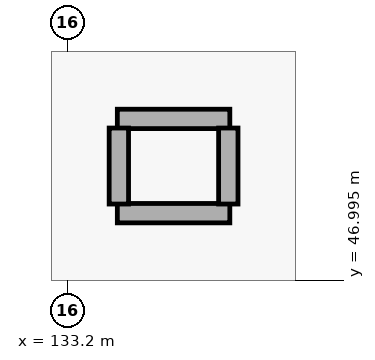
"""IFC4 building model, lengths in metres.
Left out: names, types, materials, properties, quantities, classifications, styles, units other than length and angle.
Written with IfcOpenShell. Run it as: python <this file> out.ifc"""

import sys

from ifc_helpers import new_model, si_unit, direction, frame, frame_2d, origin, place, context, subcontext, project, spatial, rectangle, extrude, element, save


model = new_model("IFC4")
c1 = context("Model", 3, precision=1e-05, world=origin(), true_north=direction((0.0, 1.0)))
c2 = subcontext(c1, "Body", "Model", "MODEL_VIEW")
j1 = project(units=[si_unit("LENGTHUNIT", "METRE"), si_unit("PLANEANGLEUNIT", "RADIAN")], contexts=[c1])
p1 = place(None, origin())
s1 = spatial("IfcSite", under=j1, at=p1, CompositionType="ELEMENT")
p2 = place(p1, origin())
s2 = spatial("IfcBuilding", under=s1, at=p2, CompositionType="ELEMENT")
p3 = place(p2, frame((0.0, 0.0, 15.6)))
s3 = spatial("IfcBuildingStorey", under=s2, at=p3, CompositionType="ELEMENT", Elevation=15.6)
for number, where, z_axis, x_axis in (
    (1, (133.86, 49.12, 0.0), (0.0, 0.0, 1.0), (1.0, 0.0, 0.0)),
    (2, (133.86, 47.88, 0.0), (0.0, 0.0, 1.0), (1.0, 0.0, 0.0)),
):
    element("IfcWall", number, at=place(p3, frame(where, z_axis=z_axis, x_axis=x_axis)), inside=s3, PredefinedType="PARTITIONING", context=c2, shape_type="SweptSolid", body=[
        extrude(rectangle(XDim=1.48, YDim=0.255, at=frame_2d((0.74, 0.0))), origin(), (0.0, 0.0, 1.0), 4.72),
    ])
for number, where, z_axis, x_axis in (
    (3, (133.88, 48.0, 0.0), (0.0, 0.0, 1.0), (0.0, 1.0, 0.0)),
    (4, (135.32, 48.0, 0.0), (0.0, 0.0, 1.0), (0.0, 1.0, 0.0)),
):
    element("IfcWall", number, at=place(p3, frame(where, z_axis=z_axis, x_axis=x_axis)), inside=s3, PredefinedType="PARTITIONING", context=c2, shape_type="SweptSolid", body=[
        extrude(rectangle(XDim=1.0, YDim=0.255, at=frame_2d((0.5, 0.0))), origin(), (0.0, 0.0, 1.0), 4.72),
    ])
save(model, sys.argv[1])
